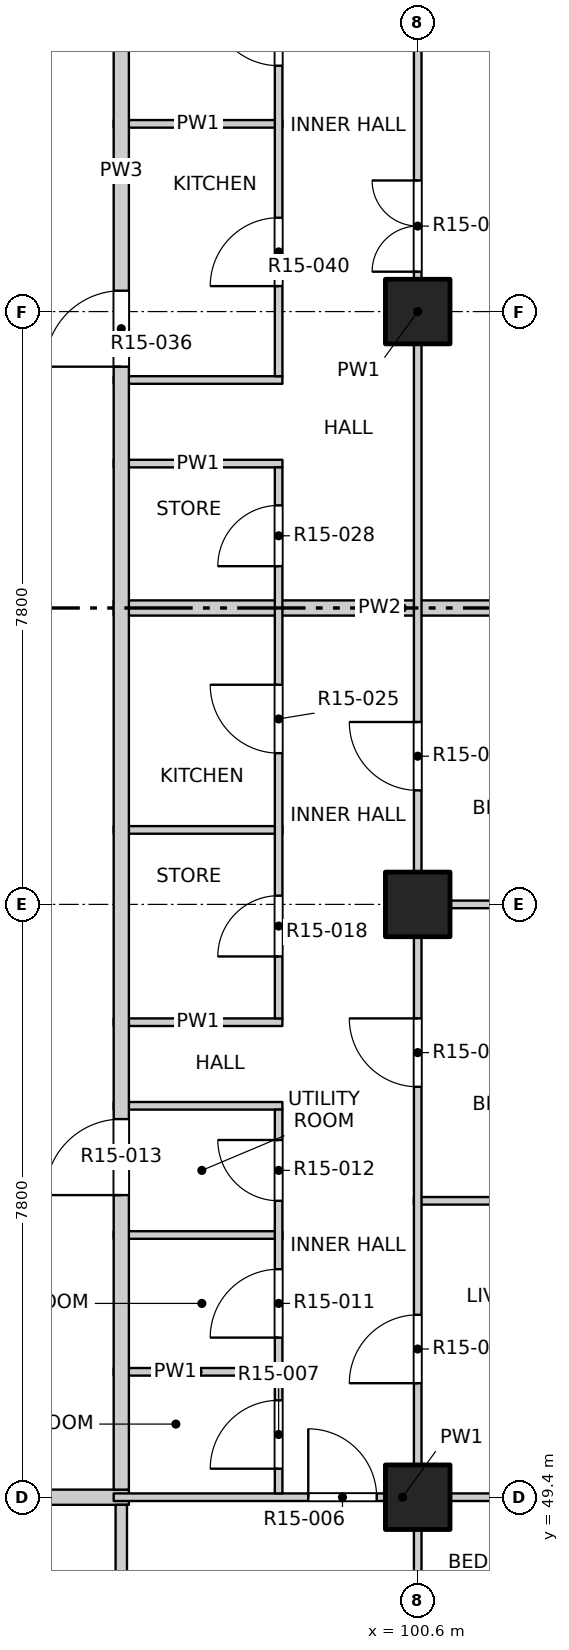
"""IFC4 building model, lengths in metres.
Left out: names, types, materials, properties, quantities, classifications, styles, units other than length and angle.
Written with IfcOpenShell. Run it as: python <this file> out.ifc"""

import sys

from ifc_helpers import new_model, si_unit, direction, frame, frame_2d, origin, origin_2d, place, context, subcontext, project, spatial, rectangle, extrude, element, fill, save


model = new_model("IFC4")
c1 = context("Model", 3, precision=1e-05, world=origin(), true_north=direction((0.0, 1.0)))
c2 = subcontext(c1, "Body", "Model", "MODEL_VIEW")
j1 = project(units=[si_unit("LENGTHUNIT", "METRE"), si_unit("PLANEANGLEUNIT", "RADIAN")], contexts=[c1])
p1 = place(None, origin())
s1 = spatial("IfcSite", under=j1, at=p1, CompositionType="ELEMENT")
p2 = place(p1, origin())
s2 = spatial("IfcBuilding", under=s1, at=p2, CompositionType="ELEMENT")
p3 = place(p2, frame((0.0, 0.0, 158.8)))
s3 = spatial("IfcBuildingStorey", under=s2, at=p3, CompositionType="ELEMENT", Elevation=158.8)
for number, where, z_axis, x_axis in (
    (1, (100.6, 49.4, -0.25), (0.0, 0.0, 1.0), (1.0, 0.0, 0.0)),
    (2, (100.6, 57.2, -0.25), (0.0, 0.0, 1.0), (1.0, 0.0, 0.0)),
    (3, (100.6, 65.0, -0.25), (0.0, 0.0, 1.0), (1.0, 0.0, 0.0)),
):
    element("IfcColumn", number, at=place(p3, frame(where, z_axis=z_axis, x_axis=x_axis)), inside=s3, PredefinedType="COLUMN", context=c2, shape_type="SweptSolid", body=[
        extrude(rectangle(XDim=0.85, YDim=0.85, at=origin_2d()), origin(), (0.0, 0.0, 1.0), 3.4),
    ])
p4 = place(p3, frame((73.2, 49.4, 0.0), z_axis=(0.0, 0.0, 1.0), x_axis=(1.0, 0.0, 0.0)))
e4 = element("IfcWall", 4, at=p4, inside=s3, PredefinedType="PARTITIONING", context=c2, shape_type="SweptSolid", body=[
    extrude(rectangle(XDim=23.6, YDim=0.2, at=frame_2d((11.8, 0.0))), origin(), (0.0, 0.0, 1.0), 3.15),
])
p5 = place(p4, frame((4.525, 0.0, 0.0)))
e5 = element("IfcOpeningElement", 5, at=p5, cuts=e4, PredefinedType="OPENING", context=c2, shape_type="SweptSolid", body=[
    extrude(rectangle(XDim=1.2, YDim=2.1, at=frame_2d((0.6, 1.05))), frame((0.0, 0.11, 0.0), z_axis=(0.0, -1.0, 0.0), x_axis=(1.0, 0.0, 0.0)), (0.0, 0.0, 1.0), 0.22),
])
p6 = place(p4, frame((15.1, 0.0, 0.0)))
e6 = element("IfcOpeningElement", 6, at=p6, cuts=e4, PredefinedType="OPENING", context=c2, shape_type="SweptSolid", body=[
    extrude(rectangle(XDim=1.2, YDim=2.1, at=frame_2d((0.6, 1.05))), frame((0.0, 0.11, 0.0), z_axis=(0.0, -1.0, 0.0), x_axis=(1.0, 0.0, 0.0)), (0.0, 0.0, 1.0), 0.22),
])
p7 = place(p3, frame((96.6, 49.4, 0.0), z_axis=(0.0, 0.0, 1.0), x_axis=(1.0, 0.0, 0.0)))
e7 = element("IfcWall", 7, at=p7, inside=s3, PredefinedType="PARTITIONING", context=c2, shape_type="SweptSolid", body=[
    extrude(rectangle(XDim=7.6, YDim=0.1, at=frame_2d((3.8, 0.0))), origin(), (0.0, 0.0, 1.0), 3.15),
])
p8 = place(p7, frame((2.56, 0.0, 0.0)))
e8 = element("IfcOpeningElement", 8, at=p8, cuts=e7, PredefinedType="OPENING", context=c2, shape_type="SweptSolid", body=[
    extrude(rectangle(XDim=0.9, YDim=2.1, at=frame_2d((0.45, 1.05))), frame((0.0, 0.06, 0.0), z_axis=(0.0, -1.0, 0.0), x_axis=(1.0, 0.0, 0.0)), (0.0, 0.0, 1.0), 0.12),
])
for number, where, z_axis, x_axis in (
    (9, (96.6, 51.05, 0.0), (0.0, 0.0, 1.0), (1.0, 0.0, 0.0)),
    (10, (96.6, 52.85, 0.0), (0.0, 0.0, 1.0), (1.0, 0.0, 0.0)),
):
    element("IfcWall", number, at=place(p3, frame(where, z_axis=z_axis, x_axis=x_axis)), inside=s3, PredefinedType="PARTITIONING", context=c2, shape_type="SweptSolid", body=[
        extrude(rectangle(XDim=2.22, YDim=0.1, at=frame_2d((1.11, 0.0))), origin(), (0.0, 0.0, 1.0), 3.15),
    ])
p9 = place(p3, frame((100.55, 53.3, 0.0), z_axis=(0.0, 0.0, 1.0), x_axis=(1.0, 0.0, 0.0)))
e11 = element("IfcWall", 11, at=p9, inside=s3, PredefinedType="PARTITIONING", context=c2, shape_type="SweptSolid", body=[
    extrude(rectangle(XDim=3.65, YDim=0.1, at=frame_2d((1.825, 0.0))), origin(), (0.0, 0.0, 1.0), 3.15),
])
for number, where, z_axis, x_axis in (
    (12, (96.6, 54.55, 0.0), (0.0, 0.0, 1.0), (1.0, 0.0, 0.0)),
    (13, (96.6, 55.65, 0.0), (0.0, 0.0, 1.0), (1.0, 0.0, 0.0)),
):
    element("IfcWall", number, at=place(p3, frame(where, z_axis=z_axis, x_axis=x_axis)), inside=s3, PredefinedType="PARTITIONING", context=c2, shape_type="SweptSolid", body=[
        extrude(rectangle(XDim=2.22, YDim=0.1, at=frame_2d((1.11, 0.0))), origin(), (0.0, 0.0, 1.0), 3.15),
    ])
p10 = place(p3, frame((100.55, 57.2, 0.0), z_axis=(0.0, 0.0, 1.0), x_axis=(1.0, 0.0, 0.0)))
e14 = element("IfcWall", 14, at=p10, inside=s3, PredefinedType="PARTITIONING", context=c2, shape_type="SweptSolid", body=[
    extrude(rectangle(XDim=3.65, YDim=0.1, at=frame_2d((1.825, 0.0))), origin(), (0.0, 0.0, 1.0), 3.15),
])
p11 = place(p3, frame((96.6, 58.18, 0.0), z_axis=(0.0, 0.0, 1.0), x_axis=(1.0, 0.0, 0.0)))
e15 = element("IfcWall", 15, at=p11, inside=s3, PredefinedType="PARTITIONING", context=c2, shape_type="SweptSolid", body=[
    extrude(rectangle(XDim=2.22, YDim=0.1, at=frame_2d((1.11, 0.0))), origin(), (0.0, 0.0, 1.0), 3.15),
])
p12 = place(p3, frame((96.6, 61.1, 0.0), z_axis=(0.0, 0.0, 1.0), x_axis=(1.0, 0.0, 0.0)))
e16 = element("IfcWall", 16, at=p12, inside=s3, PredefinedType="PARTITIONING", context=c2, shape_type="SweptSolid", body=[
    extrude(rectangle(XDim=7.6, YDim=0.2, at=frame_2d((3.8, 0.0))), origin(), (0.0, 0.0, 1.0), 2.55),
])
for number, where, z_axis, x_axis in (
    (17, (96.6, 63.0, 0.0), (0.0, 0.0, 1.0), (1.0, 0.0, 0.0)),
    (18, (96.6, 64.1, 0.0), (0.0, 0.0, 1.0), (1.0, 0.0, 0.0)),
    (19, (96.6, 67.47, 0.0), (0.0, 0.0, 1.0), (1.0, 0.0, 0.0)),
):
    element("IfcWall", number, at=place(p3, frame(where, z_axis=z_axis, x_axis=x_axis)), inside=s3, PredefinedType="PARTITIONING", context=c2, shape_type="SweptSolid", body=[
        extrude(rectangle(XDim=2.22, YDim=0.1, at=frame_2d((1.11, 0.0))), origin(), (0.0, 0.0, 1.0), 3.15),
    ])
p13 = place(p3, frame((96.7, 45.8, 0.0), z_axis=(0.0, 0.0, 1.0), x_axis=(0.0, 1.0, 0.0)))
e20 = element("IfcWall", 20, at=p13, inside=s3, PredefinedType="PARTITIONING", context=c2, shape_type="SweptSolid", body=[
    extrude(rectangle(XDim=3.5, YDim=0.15, at=frame_2d((1.75, 0.0))), origin(), (0.0, 0.0, 1.0), 3.15),
])
p14 = place(p3, frame((96.7, 49.5, 0.0), z_axis=(0.0, 0.0, 1.0), x_axis=(0.0, 1.0, 0.0)))
e21 = element("IfcWall", 21, at=p14, inside=s3, PredefinedType="PARTITIONING", context=c2, shape_type="SweptSolid", body=[
    extrude(rectangle(XDim=34.7, YDim=0.2, at=frame_2d((17.35, 0.0))), origin(), (0.0, 0.0, 1.0), 3.15),
])
p15 = place(p14, frame((3.875, 0.0, 0.0)))
e22 = element("IfcOpeningElement", 22, at=p15, cuts=e21, PredefinedType="OPENING", context=c2, shape_type="SweptSolid", body=[
    extrude(rectangle(XDim=1.0, YDim=2.1, at=frame_2d((0.5, 1.05))), frame((0.0, 0.11, 0.0), z_axis=(0.0, -1.0, 0.0), x_axis=(1.0, 0.0, 0.0)), (0.0, 0.0, 1.0), 0.22),
])
p16 = place(p14, frame((14.775, 0.0, 0.0)))
e23 = element("IfcOpeningElement", 23, at=p16, cuts=e21, PredefinedType="OPENING", context=c2, shape_type="SweptSolid", body=[
    extrude(rectangle(XDim=1.0, YDim=2.1, at=frame_2d((0.5, 1.05))), frame((0.0, 0.11, 0.0), z_axis=(0.0, -1.0, 0.0), x_axis=(1.0, 0.0, 0.0)), (0.0, 0.0, 1.0), 0.22),
])
p17 = place(p14, frame((29.175, 0.0, 0.0)))
e24 = element("IfcOpeningElement", 24, at=p17, cuts=e21, PredefinedType="OPENING", context=c2, shape_type="SweptSolid", body=[
    extrude(rectangle(XDim=1.0, YDim=2.1, at=frame_2d((0.5, 1.05))), frame((0.0, 0.11, 0.0), z_axis=(0.0, -1.0, 0.0), x_axis=(1.0, 0.0, 0.0)), (0.0, 0.0, 1.0), 0.22),
])
p18 = place(p3, frame((98.77, 49.45, 0.0), z_axis=(0.0, 0.0, 1.0), x_axis=(0.0, 1.0, 0.0)))
e25 = element("IfcWall", 25, at=p18, inside=s3, PredefinedType="PARTITIONING", context=c2, shape_type="SweptSolid", body=[
    extrude(rectangle(XDim=5.05, YDim=0.1, at=frame_2d((2.525, 0.0))), origin(), (0.0, 0.0, 1.0), 3.15),
])
p19 = place(p18, frame((0.325, 0.0, 0.0)))
e26 = element("IfcOpeningElement", 26, at=p19, cuts=e25, PredefinedType="OPENING", context=c2, shape_type="SweptSolid", body=[
    extrude(rectangle(XDim=0.9, YDim=2.1, at=frame_2d((0.45, 1.05))), frame((0.0, 0.06, 0.0), z_axis=(0.0, -1.0, 0.0), x_axis=(1.0, 0.0, 0.0)), (0.0, 0.0, 1.0), 0.12),
])
p20 = place(p18, frame((2.05, 0.0, 0.0)))
e27 = element("IfcOpeningElement", 27, at=p20, cuts=e25, PredefinedType="OPENING", context=c2, shape_type="SweptSolid", body=[
    extrude(rectangle(XDim=0.9, YDim=2.1, at=frame_2d((0.45, 1.05))), frame((0.0, 0.06, 0.0), z_axis=(0.0, -1.0, 0.0), x_axis=(1.0, 0.0, 0.0)), (0.0, 0.0, 1.0), 0.12),
])
p21 = place(p18, frame((3.85, 0.0, 0.0)))
e28 = element("IfcOpeningElement", 28, at=p21, cuts=e25, PredefinedType="OPENING", context=c2, shape_type="SweptSolid", body=[
    extrude(rectangle(XDim=0.8, YDim=2.1, at=frame_2d((0.4, 1.05))), frame((0.0, 0.06, 0.0), z_axis=(0.0, -1.0, 0.0), x_axis=(1.0, 0.0, 0.0)), (0.0, 0.0, 1.0), 0.12),
])
p22 = place(p3, frame((98.77, 55.7, 0.0), z_axis=(0.0, 0.0, 1.0), x_axis=(0.0, 1.0, 0.0)))
e29 = element("IfcWall", 29, at=p22, inside=s3, PredefinedType="PARTITIONING", context=c2, shape_type="SweptSolid", body=[
    extrude(rectangle(XDim=7.25, YDim=0.1, at=frame_2d((3.625, 0.0))), origin(), (0.0, 0.0, 1.0), 3.15),
])
p23 = place(p22, frame((0.815, 0.0, 0.0)))
e30 = element("IfcOpeningElement", 30, at=p23, cuts=e29, PredefinedType="OPENING", context=c2, shape_type="SweptSolid", body=[
    extrude(rectangle(XDim=0.8, YDim=2.1, at=frame_2d((0.4, 1.05))), frame((0.0, 0.06, 0.0), z_axis=(0.0, -1.0, 0.0), x_axis=(1.0, 0.0, 0.0)), (0.0, 0.0, 1.0), 0.12),
])
p24 = place(p22, frame((3.49, 0.0, 0.0)))
e31 = element("IfcOpeningElement", 31, at=p24, cuts=e29, PredefinedType="OPENING", context=c2, shape_type="SweptSolid", body=[
    extrude(rectangle(XDim=0.9, YDim=2.1, at=frame_2d((0.45, 1.05))), frame((0.0, 0.06, 0.0), z_axis=(0.0, -1.0, 0.0), x_axis=(1.0, 0.0, 0.0)), (0.0, 0.0, 1.0), 0.12),
])
p25 = place(p22, frame((5.95, 0.0, 0.0)))
e32 = element("IfcOpeningElement", 32, at=p25, cuts=e29, PredefinedType="OPENING", context=c2, shape_type="SweptSolid", body=[
    extrude(rectangle(XDim=0.8, YDim=2.1, at=frame_2d((0.4, 1.05))), frame((0.0, 0.06, 0.0), z_axis=(0.0, -1.0, 0.0), x_axis=(1.0, 0.0, 0.0)), (0.0, 0.0, 1.0), 0.12),
])
p26 = place(p3, frame((98.77, 64.15, 0.0), z_axis=(0.0, 0.0, 1.0), x_axis=(0.0, 1.0, 0.0)))
e33 = element("IfcWall", 33, at=p26, inside=s3, PredefinedType="PARTITIONING", context=c2, shape_type="SweptSolid", body=[
    extrude(rectangle(XDim=13.2, YDim=0.1, at=frame_2d((6.6, 0.0))), origin(), (0.0, 0.0, 1.0), 3.15),
])
p27 = place(p26, frame((1.185, 0.0, 0.0)))
e34 = element("IfcOpeningElement", 34, at=p27, cuts=e33, PredefinedType="OPENING", context=c2, shape_type="SweptSolid", body=[
    extrude(rectangle(XDim=0.9, YDim=2.1, at=frame_2d((0.45, 1.05))), frame((0.0, 0.06, 0.0), z_axis=(0.0, -1.0, 0.0), x_axis=(1.0, 0.0, 0.0)), (0.0, 0.0, 1.0), 0.12),
])
p28 = place(p26, frame((4.085, 0.0, 0.0)))
e35 = element("IfcOpeningElement", 35, at=p28, cuts=e33, PredefinedType="OPENING", context=c2, shape_type="SweptSolid", body=[
    extrude(rectangle(XDim=0.9, YDim=2.1, at=frame_2d((0.45, 1.05))), frame((0.0, 0.06, 0.0), z_axis=(0.0, -1.0, 0.0), x_axis=(1.0, 0.0, 0.0)), (0.0, 0.0, 1.0), 0.12),
])
p29 = place(p26, frame((6.8, 0.0, 0.0)))
e36 = element("IfcOpeningElement", 36, at=p29, cuts=e33, PredefinedType="OPENING", context=c2, shape_type="SweptSolid", body=[
    extrude(rectangle(XDim=0.8, YDim=2.1, at=frame_2d((0.4, 1.05))), frame((0.0, 0.06, 0.0), z_axis=(0.0, -1.0, 0.0), x_axis=(1.0, 0.0, 0.0)), (0.0, 0.0, 1.0), 0.12),
])
p30 = place(p26, frame((9.175, 0.0, 0.0)))
e37 = element("IfcOpeningElement", 37, at=p30, cuts=e33, PredefinedType="OPENING", context=c2, shape_type="SweptSolid", body=[
    extrude(rectangle(XDim=0.9, YDim=2.1, at=frame_2d((0.45, 1.05))), frame((0.0, 0.06, 0.0), z_axis=(0.0, -1.0, 0.0), x_axis=(1.0, 0.0, 0.0)), (0.0, 0.0, 1.0), 0.12),
])
p31 = place(p26, frame((11.475, 0.0, 0.0)))
e38 = element("IfcOpeningElement", 38, at=p31, cuts=e33, PredefinedType="OPENING", context=c2, shape_type="SweptSolid", body=[
    extrude(rectangle(XDim=0.9, YDim=2.1, at=frame_2d((0.45, 1.05))), frame((0.0, 0.06, 0.0), z_axis=(0.0, -1.0, 0.0), x_axis=(1.0, 0.0, 0.0)), (0.0, 0.0, 1.0), 0.12),
])
p32 = place(p3, frame((100.6, 45.8, 0.0), z_axis=(0.0, 0.0, 1.0), x_axis=(0.0, 1.0, 0.0)))
e39 = element("IfcWall", 39, at=p32, inside=s3, PredefinedType="PARTITIONING", context=c2, shape_type="SweptSolid", body=[
    extrude(rectangle(XDim=38.4, YDim=0.1, at=frame_2d((19.2, 0.0))), origin(), (0.0, 0.0, 1.0), 3.15),
])
p33 = place(p32, frame((1.05, 0.0, 0.0)))
e40 = element("IfcOpeningElement", 40, at=p33, cuts=e39, PredefinedType="OPENING", context=c2, shape_type="SweptSolid", body=[
    extrude(rectangle(XDim=1.2, YDim=2.1, at=frame_2d((0.6, 1.05))), frame((0.0, 0.06, 0.0), z_axis=(0.0, -1.0, 0.0), x_axis=(1.0, 0.0, 0.0)), (0.0, 0.0, 1.0), 0.12),
])
p34 = place(p32, frame((5.1, 0.0, 0.0)))
e41 = element("IfcOpeningElement", 41, at=p34, cuts=e39, PredefinedType="OPENING", context=c2, shape_type="SweptSolid", body=[
    extrude(rectangle(XDim=0.9, YDim=2.1, at=frame_2d((0.45, 1.05))), frame((0.0, 0.06, 0.0), z_axis=(0.0, -1.0, 0.0), x_axis=(1.0, 0.0, 0.0)), (0.0, 0.0, 1.0), 0.12),
])
p35 = place(p32, frame((9.0, 0.0, 0.0)))
e42 = element("IfcOpeningElement", 42, at=p35, cuts=e39, PredefinedType="OPENING", context=c2, shape_type="SweptSolid", body=[
    extrude(rectangle(XDim=0.9, YDim=2.1, at=frame_2d((0.45, 1.05))), frame((0.0, 0.06, 0.0), z_axis=(0.0, -1.0, 0.0), x_axis=(1.0, 0.0, 0.0)), (0.0, 0.0, 1.0), 0.12),
])
p36 = place(p32, frame((12.9, 0.0, 0.0)))
e43 = element("IfcOpeningElement", 43, at=p36, cuts=e39, PredefinedType="OPENING", context=c2, shape_type="SweptSolid", body=[
    extrude(rectangle(XDim=0.9, YDim=2.1, at=frame_2d((0.45, 1.05))), frame((0.0, 0.06, 0.0), z_axis=(0.0, -1.0, 0.0), x_axis=(1.0, 0.0, 0.0)), (0.0, 0.0, 1.0), 0.12),
])
p37 = place(p32, frame((19.725, 0.0, 0.0)))
e44 = element("IfcOpeningElement", 44, at=p37, cuts=e39, PredefinedType="OPENING", context=c2, shape_type="SweptSolid", body=[
    extrude(rectangle(XDim=1.2, YDim=2.1, at=frame_2d((0.6, 1.05))), frame((0.0, 0.06, 0.0), z_axis=(0.0, -1.0, 0.0), x_axis=(1.0, 0.0, 0.0)), (0.0, 0.0, 1.0), 0.12),
])
p38 = place(p32, frame((24.6, 0.0, 0.0)))
e45 = element("IfcOpeningElement", 45, at=p38, cuts=e39, PredefinedType="OPENING", context=c2, shape_type="SweptSolid", body=[
    extrude(rectangle(XDim=0.9, YDim=2.1, at=frame_2d((0.45, 1.05))), frame((0.0, 0.06, 0.0), z_axis=(0.0, -1.0, 0.0), x_axis=(1.0, 0.0, 0.0)), (0.0, 0.0, 1.0), 0.12),
])
p39 = place(p32, frame((30.3, 0.0, 0.0)))
e46 = element("IfcOpeningElement", 46, at=p39, cuts=e39, PredefinedType="OPENING", context=c2, shape_type="SweptSolid", body=[
    extrude(rectangle(XDim=1.2, YDim=2.1, at=frame_2d((0.6, 1.05))), frame((0.0, 0.06, 0.0), z_axis=(0.0, -1.0, 0.0), x_axis=(1.0, 0.0, 0.0)), (0.0, 0.0, 1.0), 0.12),
])
p40 = place(p32, frame((36.15, 0.0, 0.0)))
e47 = element("IfcOpeningElement", 47, at=p40, cuts=e39, PredefinedType="OPENING", context=c2, shape_type="SweptSolid", body=[
    extrude(rectangle(XDim=1.2, YDim=2.1, at=frame_2d((0.6, 1.05))), frame((0.0, 0.06, 0.0), z_axis=(0.0, -1.0, 0.0), x_axis=(1.0, 0.0, 0.0)), (0.0, 0.0, 1.0), 0.12),
])
p41 = place(p8, origin())
e48 = element("IfcDoor", 48, at=p41, inside=s3, OperationType="SINGLE_SWING_LEFT", PredefinedType="DOOR", context=c2, shape_type="SweptSolid", body=[
    extrude(rectangle(XDim=0.9, YDim=2.1, at=frame_2d((0.45, 1.05))), frame((0.0, 0.025, 0.0), z_axis=(0.0, -1.0, 0.0), x_axis=(1.0, 0.0, 0.0)), (0.0, 0.0, 1.0), 0.05),
])
fill(e8, e48)
p42 = place(p19, origin())
e49 = element("IfcDoor", 49, at=p42, inside=s3, OperationType="SINGLE_SWING_LEFT", PredefinedType="DOOR", context=c2, shape_type="SweptSolid", body=[
    extrude(rectangle(XDim=0.9, YDim=2.1, at=frame_2d((0.45, 1.05))), frame((0.0, 0.025, 0.0), z_axis=(0.0, -1.0, 0.0), x_axis=(1.0, 0.0, 0.0)), (0.0, 0.0, 1.0), 0.05),
])
fill(e26, e49)
p43 = place(p34, origin())
e50 = element("IfcDoor", 50, at=p43, inside=s3, OperationType="SINGLE_SWING_LEFT", PredefinedType="DOOR", context=c2, shape_type="SweptSolid", body=[
    extrude(rectangle(XDim=0.9, YDim=2.1, at=frame_2d((0.45, 1.05))), frame((0.0, 0.025, 0.0), z_axis=(0.0, -1.0, 0.0), x_axis=(1.0, 0.0, 0.0)), (0.0, 0.0, 1.0), 0.05),
])
fill(e41, e50)
p44 = place(p20, origin())
e51 = element("IfcDoor", 51, at=p44, inside=s3, OperationType="SINGLE_SWING_LEFT", PredefinedType="DOOR", context=c2, shape_type="SweptSolid", body=[
    extrude(rectangle(XDim=0.9, YDim=2.1, at=frame_2d((0.45, 1.05))), frame((0.0, 0.025, 0.0), z_axis=(0.0, -1.0, 0.0), x_axis=(1.0, 0.0, 0.0)), (0.0, 0.0, 1.0), 0.05),
])
fill(e27, e51)
p45 = place(p21, origin())
e52 = element("IfcDoor", 52, at=p45, inside=s3, OperationType="SINGLE_SWING_RIGHT", PredefinedType="DOOR", context=c2, shape_type="SweptSolid", body=[
    extrude(rectangle(XDim=0.8, YDim=2.1, at=frame_2d((0.4, 1.05))), frame((0.0, 0.025, 0.0), z_axis=(0.0, -1.0, 0.0), x_axis=(1.0, 0.0, 0.0)), (0.0, 0.0, 1.0), 0.05),
])
fill(e28, e52)
p46 = place(p15, origin())
e53 = element("IfcDoor", 53, at=p46, inside=s3, OperationType="SINGLE_SWING_RIGHT", PredefinedType="DOOR", context=c2, shape_type="SweptSolid", body=[
    extrude(rectangle(XDim=1.0, YDim=2.1, at=frame_2d((0.5, 1.05))), frame((0.0, 0.025, 0.0), z_axis=(0.0, -1.0, 0.0), x_axis=(1.0, 0.0, 0.0)), (0.0, 0.0, 1.0), 0.05),
])
fill(e22, e53)
p47 = place(p35, origin())
e54 = element("IfcDoor", 54, at=p47, inside=s3, OperationType="SINGLE_SWING_RIGHT", PredefinedType="DOOR", context=c2, shape_type="SweptSolid", body=[
    extrude(rectangle(XDim=0.9, YDim=2.1, at=frame_2d((0.45, 1.05))), frame((0.0, 0.025, 0.0), z_axis=(0.0, -1.0, 0.0), x_axis=(1.0, 0.0, 0.0)), (0.0, 0.0, 1.0), 0.05),
])
fill(e42, e54)
p48 = place(p23, origin())
e55 = element("IfcDoor", 55, at=p48, inside=s3, OperationType="SINGLE_SWING_LEFT", PredefinedType="DOOR", context=c2, shape_type="SweptSolid", body=[
    extrude(rectangle(XDim=0.8, YDim=2.1, at=frame_2d((0.4, 1.05))), frame((0.0, 0.025, 0.0), z_axis=(0.0, -1.0, 0.0), x_axis=(1.0, 0.0, 0.0)), (0.0, 0.0, 1.0), 0.05),
])
fill(e30, e55)
p49 = place(p36, origin())
e56 = element("IfcDoor", 56, at=p49, inside=s3, OperationType="SINGLE_SWING_RIGHT", PredefinedType="DOOR", context=c2, shape_type="SweptSolid", body=[
    extrude(rectangle(XDim=0.9, YDim=2.1, at=frame_2d((0.45, 1.05))), frame((0.0, 0.025, 0.0), z_axis=(0.0, -1.0, 0.0), x_axis=(1.0, 0.0, 0.0)), (0.0, 0.0, 1.0), 0.05),
])
fill(e43, e56)
p50 = place(p24, origin())
e57 = element("IfcDoor", 57, at=p50, inside=s3, OperationType="SINGLE_SWING_RIGHT", PredefinedType="DOOR", context=c2, shape_type="SweptSolid", body=[
    extrude(rectangle(XDim=0.9, YDim=2.1, at=frame_2d((0.45, 1.05))), frame((0.0, 0.025, 0.0), z_axis=(0.0, -1.0, 0.0), x_axis=(1.0, 0.0, 0.0)), (0.0, 0.0, 1.0), 0.05),
])
fill(e31, e57)
p51 = place(p25, origin())
e58 = element("IfcDoor", 58, at=p51, inside=s3, OperationType="SINGLE_SWING_LEFT", PredefinedType="DOOR", context=c2, shape_type="SweptSolid", body=[
    extrude(rectangle(XDim=0.8, YDim=2.1, at=frame_2d((0.4, 1.05))), frame((0.0, 0.025, 0.0), z_axis=(0.0, -1.0, 0.0), x_axis=(1.0, 0.0, 0.0)), (0.0, 0.0, 1.0), 0.05),
])
fill(e32, e58)
p52 = place(p16, origin())
e59 = element("IfcDoor", 59, at=p52, inside=s3, OperationType="SINGLE_SWING_LEFT", PredefinedType="DOOR", context=c2, shape_type="SweptSolid", body=[
    extrude(rectangle(XDim=1.0, YDim=2.1, at=frame_2d((0.5, 1.05))), frame((0.0, 0.025, 0.0), z_axis=(0.0, -1.0, 0.0), x_axis=(1.0, 0.0, 0.0)), (0.0, 0.0, 1.0), 0.05),
])
fill(e23, e59)
p53 = place(p27, origin())
e60 = element("IfcDoor", 60, at=p53, inside=s3, OperationType="SINGLE_SWING_LEFT", PredefinedType="DOOR", context=c2, shape_type="SweptSolid", body=[
    extrude(rectangle(XDim=0.9, YDim=2.1, at=frame_2d((0.45, 1.05))), frame((0.0, 0.025, 0.0), z_axis=(0.0, -1.0, 0.0), x_axis=(1.0, 0.0, 0.0)), (0.0, 0.0, 1.0), 0.05),
])
fill(e34, e60)
p54 = place(p37, origin())
e61 = element("IfcDoor", 61, at=p54, inside=s3, OperationType="DOUBLE_DOOR_SINGLE_SWING", PredefinedType="DOOR", context=c2, shape_type="SweptSolid", body=[
    extrude(rectangle(XDim=1.2, YDim=2.1, at=frame_2d((0.6, 1.05))), frame((0.0, 0.025, 0.0), z_axis=(0.0, -1.0, 0.0), x_axis=(1.0, 0.0, 0.0)), (0.0, 0.0, 1.0), 0.05),
])
fill(e44, e61)
p55 = place(p28, origin())
e62 = element("IfcDoor", 62, at=p55, inside=s3, OperationType="SINGLE_SWING_RIGHT", PredefinedType="DOOR", context=c2, shape_type="SweptSolid", body=[
    extrude(rectangle(XDim=0.9, YDim=2.1, at=frame_2d((0.45, 1.05))), frame((0.0, 0.025, 0.0), z_axis=(0.0, -1.0, 0.0), x_axis=(1.0, 0.0, 0.0)), (0.0, 0.0, 1.0), 0.05),
])
fill(e35, e62)
save(model, sys.argv[1])
